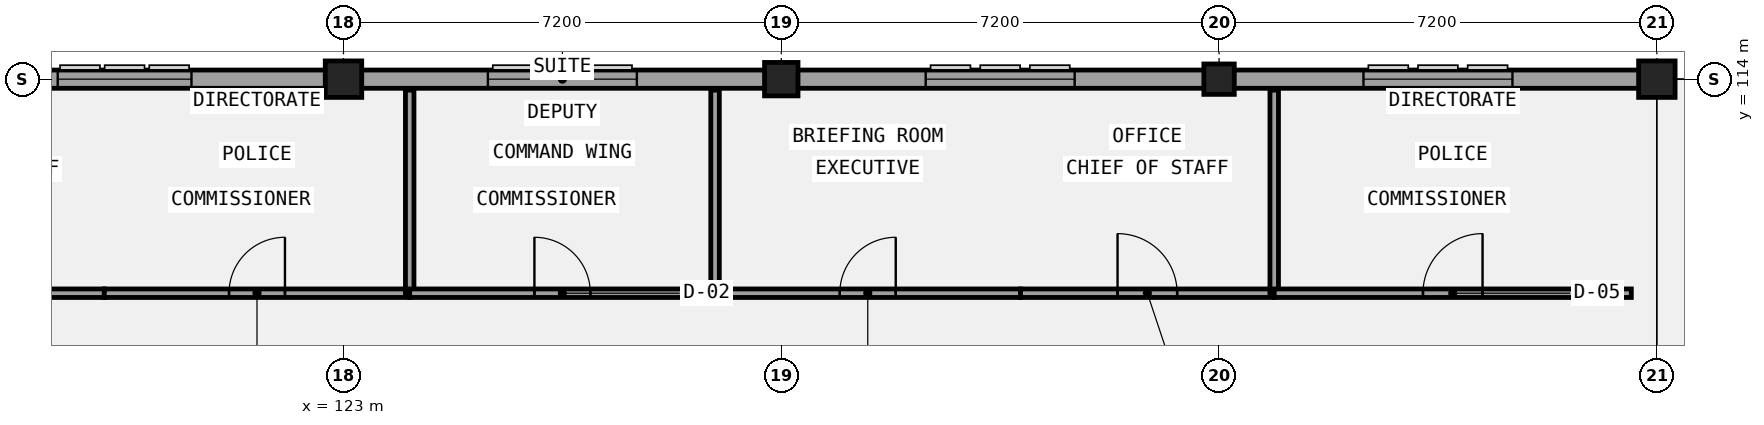
"""IFC4 building model, lengths in metres.
Left out: names, types, materials, properties, quantities, classifications, styles, units other than length and angle.
Written with IfcOpenShell. Run it as: python <this file> out.ifc"""

import sys

from ifc_helpers import new_model, si_unit, direction, frame, frame_2d, origin, origin_2d, place, context, subcontext, project, spatial, rectangle, extrude, element, fill, save


model = new_model("IFC4")
c1 = context("Model", 3, precision=1e-05, world=origin(), true_north=direction((0.0, 1.0)))
c2 = subcontext(c1, "Body", "Model", "MODEL_VIEW")
j1 = project(units=[si_unit("LENGTHUNIT", "METRE"), si_unit("PLANEANGLEUNIT", "RADIAN")], contexts=[c1])
p1 = place(None, origin())
s1 = spatial("IfcSite", under=j1, at=p1, CompositionType="ELEMENT")
p2 = place(p1, origin())
s2 = spatial("IfcBuilding", under=s1, at=p2, CompositionType="ELEMENT")
p3 = place(p2, frame((0.0, 0.0, 22.2)))
s3 = spatial("IfcBuildingStorey", under=s2, at=p3, CompositionType="ELEMENT", Elevation=22.2)
p4 = place(p3, frame((123.0, 114.0, 0.0), z_axis=(0.0, 0.0, 1.0), x_axis=(1.0, 0.0, 0.0)))
e1 = element("IfcColumn", 1, at=p4, inside=s3, PredefinedType="COLUMN", context=c2, shape_type="SweptSolid", body=[
    extrude(rectangle(XDim=0.6, YDim=0.6, at=origin_2d()), origin(), (0.0, 0.0, 1.0), 4.2),
])
p5 = place(p3, frame((130.2, 114.0, 0.0), z_axis=(0.0, 0.0, 1.0), x_axis=(1.0, 0.0, 0.0)))
e2 = element("IfcColumn", 2, at=p5, inside=s3, PredefinedType="COLUMN", context=c2, shape_type="SweptSolid", body=[
    extrude(rectangle(XDim=0.55, YDim=0.55, at=origin_2d()), origin(), (0.0, 0.0, 1.0), 4.2),
])
p6 = place(p3, frame((137.4, 114.0, 0.0), z_axis=(0.0, 0.0, 1.0), x_axis=(1.0, 0.0, 0.0)))
e3 = element("IfcColumn", 3, at=p6, inside=s3, PredefinedType="COLUMN", context=c2, shape_type="SweptSolid", body=[
    extrude(rectangle(XDim=0.5, YDim=0.5, at=origin_2d()), origin(), (0.0, 0.0, 1.0), 4.2),
])
p7 = place(p3, frame((144.6, 114.0, 0.0), z_axis=(0.0, 0.0, 1.0), x_axis=(1.0, 0.0, 0.0)))
e4 = element("IfcColumn", 4, at=p7, inside=s3, PredefinedType="COLUMN", context=c2, shape_type="SweptSolid", body=[
    extrude(rectangle(XDim=0.6, YDim=0.6, at=origin_2d()), origin(), (0.0, 0.0, 1.0), 4.2),
])
p8 = place(p3, frame((144.75, 114.0, 0.0), z_axis=(0.0, 0.0, 1.0), x_axis=(-1.0, 0.0, 0.0)))
e5 = element("IfcWall", 5, at=p8, inside=s3, PredefinedType="SOLIDWALL", context=c2, shape_type="SweptSolid", body=[
    extrude(rectangle(XDim=36.3, YDim=0.3, at=frame_2d((18.15, 0.0))), origin(), (0.0, 0.0, 1.0), 3.17),
])
p9 = place(p8, frame((31.45, 0.0, 0.95)))
e6 = element("IfcOpeningElement", 6, at=p9, cuts=e5, PredefinedType="OPENING", context=c2, shape_type="SweptSolid", body=[
    extrude(rectangle(XDim=2.2, YDim=1.65, at=frame_2d((1.1, 0.825))), frame((0.0, 0.16, 0.0), z_axis=(0.0, -1.0, 0.0), x_axis=(1.0, 0.0, 0.0)), (0.0, 0.0, 1.0), 0.32),
])
p10 = place(p8, frame((24.25, 0.0, 0.95)))
e7 = element("IfcOpeningElement", 7, at=p10, cuts=e5, PredefinedType="OPENING", context=c2, shape_type="SweptSolid", body=[
    extrude(rectangle(XDim=2.2, YDim=1.9, at=frame_2d((1.1, 0.95))), frame((0.0, 0.16, 0.0), z_axis=(0.0, -1.0, 0.0), x_axis=(1.0, 0.0, 0.0)), (0.0, 0.0, 1.0), 0.32),
])
p11 = place(p8, frame((16.925, 0.0, 0.95)))
e8 = element("IfcOpeningElement", 8, at=p11, cuts=e5, PredefinedType="OPENING", context=c2, shape_type="SweptSolid", body=[
    extrude(rectangle(XDim=2.45, YDim=1.4, at=frame_2d((1.225, 0.7))), frame((0.0, 0.16, 0.0), z_axis=(0.0, -1.0, 0.0), x_axis=(1.0, 0.0, 0.0)), (0.0, 0.0, 1.0), 0.32),
])
p12 = place(p8, frame((9.725, 0.0, 0.95)))
e9 = element("IfcOpeningElement", 9, at=p12, cuts=e5, PredefinedType="OPENING", context=c2, shape_type="SweptSolid", body=[
    extrude(rectangle(XDim=2.45, YDim=1.65, at=frame_2d((1.225, 0.825))), frame((0.0, 0.16, 0.0), z_axis=(0.0, -1.0, 0.0), x_axis=(1.0, 0.0, 0.0)), (0.0, 0.0, 1.0), 0.32),
])
p13 = place(p8, frame((2.525, 0.0, 0.95)))
e10 = element("IfcOpeningElement", 10, at=p13, cuts=e5, PredefinedType="OPENING", context=c2, shape_type="SweptSolid", body=[
    extrude(rectangle(XDim=2.45, YDim=1.9, at=frame_2d((1.225, 0.95))), frame((0.0, 0.16, 0.0), z_axis=(0.0, -1.0, 0.0), x_axis=(1.0, 0.0, 0.0)), (0.0, 0.0, 1.0), 0.32),
])
p14 = place(p3, frame((114.893, 110.48, 0.0), z_axis=(0.0, 0.0, 1.0), x_axis=(1.0, 0.0, 0.0)))
e11 = element("IfcWall", 11, at=p14, inside=s3, PredefinedType="PARTITIONING", context=c2, shape_type="SweptSolid", body=[
    extrude(rectangle(XDim=4.173, YDim=0.14, at=frame_2d((2.086, 0.0))), origin(), (0.0, 0.0, 1.0), 3.37),
])
p15 = place(p14, frame((1.227, 0.0, 0.0)))
e12 = element("IfcOpeningElement", 12, at=p15, cuts=e11, PredefinedType="OPENING", context=c2, shape_type="SweptSolid", body=[
    extrude(rectangle(XDim=1.72, YDim=2.35, at=frame_2d((0.86, 1.175))), frame((0.0, 0.08, 0.0), z_axis=(0.0, -1.0, 0.0), x_axis=(1.0, 0.0, 0.0)), (0.0, 0.0, 1.0), 0.16),
])
p16 = place(p3, frame((119.066, 110.48, 0.0), z_axis=(0.0, 0.0, 1.0), x_axis=(1.0, 0.0, 0.0)))
e13 = element("IfcWall", 13, at=p16, inside=s3, PredefinedType="PARTITIONING", context=c2, shape_type="SweptSolid", body=[
    extrude(rectangle(XDim=5.023, YDim=0.14, at=frame_2d((2.512, 0.0))), origin(), (0.0, 0.0, 1.0), 3.37),
])
p17 = place(p16, frame((2.052, 0.0, 0.0)))
e14 = element("IfcOpeningElement", 14, at=p17, cuts=e13, PredefinedType="OPENING", context=c2, shape_type="SweptSolid", body=[
    extrude(rectangle(XDim=0.92, YDim=2.1, at=frame_2d((0.46, 1.05))), frame((0.0, 0.08, 0.0), z_axis=(0.0, -1.0, 0.0), x_axis=(1.0, 0.0, 0.0)), (0.0, 0.0, 1.0), 0.16),
])
p18 = place(p3, frame((124.089, 110.48, 0.0), z_axis=(0.0, 0.0, 1.0), x_axis=(0.0, 1.0, 0.0)))
e15 = element("IfcWall", 15, at=p18, inside=s3, PredefinedType="PARTITIONING", context=c2, shape_type="SweptSolid", body=[
    extrude(rectangle(XDim=3.34, YDim=0.14, at=frame_2d((1.67, 0.0))), origin(), (0.0, 0.0, 1.0), 3.92),
])
p19 = place(p3, frame((124.089, 110.48, 0.0), z_axis=(0.0, 0.0, 1.0), x_axis=(1.0, 0.0, 0.0)))
e16 = element("IfcWall", 16, at=p19, inside=s3, PredefinedType="PARTITIONING", context=c2, shape_type="SweptSolid", body=[
    extrude(rectangle(XDim=5.022, YDim=0.14, at=frame_2d((2.511, 0.0))), origin(), (0.0, 0.0, 1.0), 3.37),
])
p20 = place(p19, frame((2.051, 0.0, 0.0)))
e17 = element("IfcOpeningElement", 17, at=p20, cuts=e16, PredefinedType="OPENING", context=c2, shape_type="SweptSolid", body=[
    extrude(rectangle(XDim=0.92, YDim=2.22, at=frame_2d((0.46, 1.11))), frame((0.0, 0.08, 0.0), z_axis=(0.0, -1.0, 0.0), x_axis=(1.0, 0.0, 0.0)), (0.0, 0.0, 1.0), 0.16),
])
p21 = place(p3, frame((129.111, 110.48, 0.0), z_axis=(0.0, 0.0, 1.0), x_axis=(0.0, 1.0, 0.0)))
e18 = element("IfcWall", 18, at=p21, inside=s3, PredefinedType="PARTITIONING", context=c2, shape_type="SweptSolid", body=[
    extrude(rectangle(XDim=3.34, YDim=0.14, at=frame_2d((1.67, 0.0))), origin(), (0.0, 0.0, 1.0), 3.92),
])
p22 = place(p3, frame((129.111, 110.48, 0.0), z_axis=(0.0, 0.0, 1.0), x_axis=(1.0, 0.0, 0.0)))
e19 = element("IfcWall", 19, at=p22, inside=s3, PredefinedType="PARTITIONING", context=c2, shape_type="SweptSolid", body=[
    extrude(rectangle(XDim=5.023, YDim=0.14, at=frame_2d((2.511, 0.0))), origin(), (0.0, 0.0, 1.0), 3.37),
])
p23 = place(p22, frame((2.052, 0.0, 0.0)))
e20 = element("IfcOpeningElement", 20, at=p23, cuts=e19, PredefinedType="OPENING", context=c2, shape_type="SweptSolid", body=[
    extrude(rectangle(XDim=0.92, YDim=2.35, at=frame_2d((0.46, 1.175))), frame((0.0, 0.08, 0.0), z_axis=(0.0, -1.0, 0.0), x_axis=(1.0, 0.0, 0.0)), (0.0, 0.0, 1.0), 0.16),
])
p24 = place(p3, frame((134.134, 110.48, 0.0), z_axis=(0.0, 0.0, 1.0), x_axis=(1.0, 0.0, 0.0)))
e21 = element("IfcWall", 21, at=p24, inside=s3, PredefinedType="PARTITIONING", context=c2, shape_type="SweptSolid", body=[
    extrude(rectangle(XDim=4.173, YDim=0.14, at=frame_2d((2.086, 0.0))), origin(), (0.0, 0.0, 1.0), 3.37),
])
p25 = place(p24, frame((1.596, 0.0, 0.0)))
e22 = element("IfcOpeningElement", 22, at=p25, cuts=e21, PredefinedType="OPENING", context=c2, shape_type="SweptSolid", body=[
    extrude(rectangle(XDim=0.98, YDim=2.1, at=frame_2d((0.49, 1.05))), frame((0.0, 0.08, 0.0), z_axis=(0.0, -1.0, 0.0), x_axis=(1.0, 0.0, 0.0)), (0.0, 0.0, 1.0), 0.16),
])
p26 = place(p3, frame((138.307, 110.48, 0.0), z_axis=(0.0, 0.0, 1.0), x_axis=(0.0, 1.0, 0.0)))
e23 = element("IfcWall", 23, at=p26, inside=s3, PredefinedType="PARTITIONING", context=c2, shape_type="SweptSolid", body=[
    extrude(rectangle(XDim=3.34, YDim=0.14, at=frame_2d((1.67, 0.0))), origin(), (0.0, 0.0, 1.0), 3.92),
])
p27 = place(p3, frame((138.307, 110.48, 0.0), z_axis=(0.0, 0.0, 1.0), x_axis=(1.0, 0.0, 0.0)))
e24 = element("IfcWall", 24, at=p27, inside=s3, PredefinedType="PARTITIONING", context=c2, shape_type="SweptSolid", body=[
    extrude(rectangle(XDim=5.873, YDim=0.14, at=frame_2d((2.937, 0.0))), origin(), (0.0, 0.0, 1.0), 3.37),
])
p28 = place(p27, frame((2.447, 0.0, 0.0)))
e25 = element("IfcOpeningElement", 25, at=p28, cuts=e24, PredefinedType="OPENING", context=c2, shape_type="SweptSolid", body=[
    extrude(rectangle(XDim=0.98, YDim=2.22, at=frame_2d((0.49, 1.11))), frame((0.0, 0.08, 0.0), z_axis=(0.0, -1.0, 0.0), x_axis=(1.0, 0.0, 0.0)), (0.0, 0.0, 1.0), 0.16),
])
p29 = place(p10, origin())
e26 = element("IfcWindow", 26, at=p29, inside=s3, PartitioningType="SINGLE_PANEL", PredefinedType="WINDOW", context=c2, shape_type="SweptSolid", body=[
    extrude(rectangle(XDim=2.2, YDim=1.9, at=frame_2d((1.1, 0.95))), frame((0.0, 0.03, 0.0), z_axis=(0.0, -1.0, 0.0), x_axis=(1.0, 0.0, 0.0)), (0.0, 0.0, 1.0), 0.06),
])
fill(e7, e26)
p30 = place(p11, origin())
e27 = element("IfcWindow", 27, at=p30, inside=s3, PartitioningType="SINGLE_PANEL", PredefinedType="WINDOW", context=c2, shape_type="SweptSolid", body=[
    extrude(rectangle(XDim=2.45, YDim=1.4, at=frame_2d((1.225, 0.7))), frame((0.0, 0.03, 0.0), z_axis=(0.0, -1.0, 0.0), x_axis=(1.0, 0.0, 0.0)), (0.0, 0.0, 1.0), 0.06),
])
fill(e8, e27)
p31 = place(p12, origin())
e28 = element("IfcWindow", 28, at=p31, inside=s3, PartitioningType="SINGLE_PANEL", PredefinedType="WINDOW", context=c2, shape_type="SweptSolid", body=[
    extrude(rectangle(XDim=2.45, YDim=1.65, at=frame_2d((1.225, 0.825))), frame((0.0, 0.03, 0.0), z_axis=(0.0, -1.0, 0.0), x_axis=(1.0, 0.0, 0.0)), (0.0, 0.0, 1.0), 0.06),
])
fill(e9, e28)
p32 = place(p13, origin())
e29 = element("IfcWindow", 29, at=p32, inside=s3, PartitioningType="SINGLE_PANEL", PredefinedType="WINDOW", context=c2, shape_type="SweptSolid", body=[
    extrude(rectangle(XDim=2.45, YDim=1.9, at=frame_2d((1.225, 0.95))), frame((0.0, 0.03, 0.0), z_axis=(0.0, -1.0, 0.0), x_axis=(1.0, 0.0, 0.0)), (0.0, 0.0, 1.0), 0.06),
])
fill(e10, e29)
p33 = place(p17, origin())
e30 = element("IfcDoor", 30, at=p33, inside=s3, OperationType="SINGLE_SWING_RIGHT", PredefinedType="DOOR", context=c2, shape_type="SweptSolid", body=[
    extrude(rectangle(XDim=0.92, YDim=2.1, at=frame_2d((0.46, 1.05))), frame((0.0, 0.025, 0.0), z_axis=(0.0, -1.0, 0.0), x_axis=(1.0, 0.0, 0.0)), (0.0, 0.0, 1.0), 0.05),
])
fill(e14, e30)
p34 = place(p20, origin())
e31 = element("IfcDoor", 31, at=p34, inside=s3, OperationType="SINGLE_SWING_LEFT", PredefinedType="DOOR", context=c2, shape_type="SweptSolid", body=[
    extrude(rectangle(XDim=0.92, YDim=2.22, at=frame_2d((0.46, 1.11))), frame((0.0, 0.025, 0.0), z_axis=(0.0, -1.0, 0.0), x_axis=(1.0, 0.0, 0.0)), (0.0, 0.0, 1.0), 0.05),
])
fill(e17, e31)
p35 = place(p23, origin())
e32 = element("IfcDoor", 32, at=p35, inside=s3, OperationType="SINGLE_SWING_RIGHT", PredefinedType="DOOR", context=c2, shape_type="SweptSolid", body=[
    extrude(rectangle(XDim=0.92, YDim=2.35, at=frame_2d((0.46, 1.175))), frame((0.0, 0.025, 0.0), z_axis=(0.0, -1.0, 0.0), x_axis=(1.0, 0.0, 0.0)), (0.0, 0.0, 1.0), 0.05),
])
fill(e20, e32)
p36 = place(p25, origin())
e33 = element("IfcDoor", 33, at=p36, inside=s3, OperationType="SINGLE_SWING_LEFT", PredefinedType="DOOR", context=c2, shape_type="SweptSolid", body=[
    extrude(rectangle(XDim=0.98, YDim=2.1, at=frame_2d((0.49, 1.05))), frame((0.0, 0.025, 0.0), z_axis=(0.0, -1.0, 0.0), x_axis=(1.0, 0.0, 0.0)), (0.0, 0.0, 1.0), 0.05),
])
fill(e22, e33)
p37 = place(p28, origin())
e34 = element("IfcDoor", 34, at=p37, inside=s3, OperationType="SINGLE_SWING_RIGHT", PredefinedType="DOOR", context=c2, shape_type="SweptSolid", body=[
    extrude(rectangle(XDim=0.98, YDim=2.22, at=frame_2d((0.49, 1.11))), frame((0.0, 0.025, 0.0), z_axis=(0.0, -1.0, 0.0), x_axis=(1.0, 0.0, 0.0)), (0.0, 0.0, 1.0), 0.05),
])
fill(e25, e34)
save(model, sys.argv[1])
